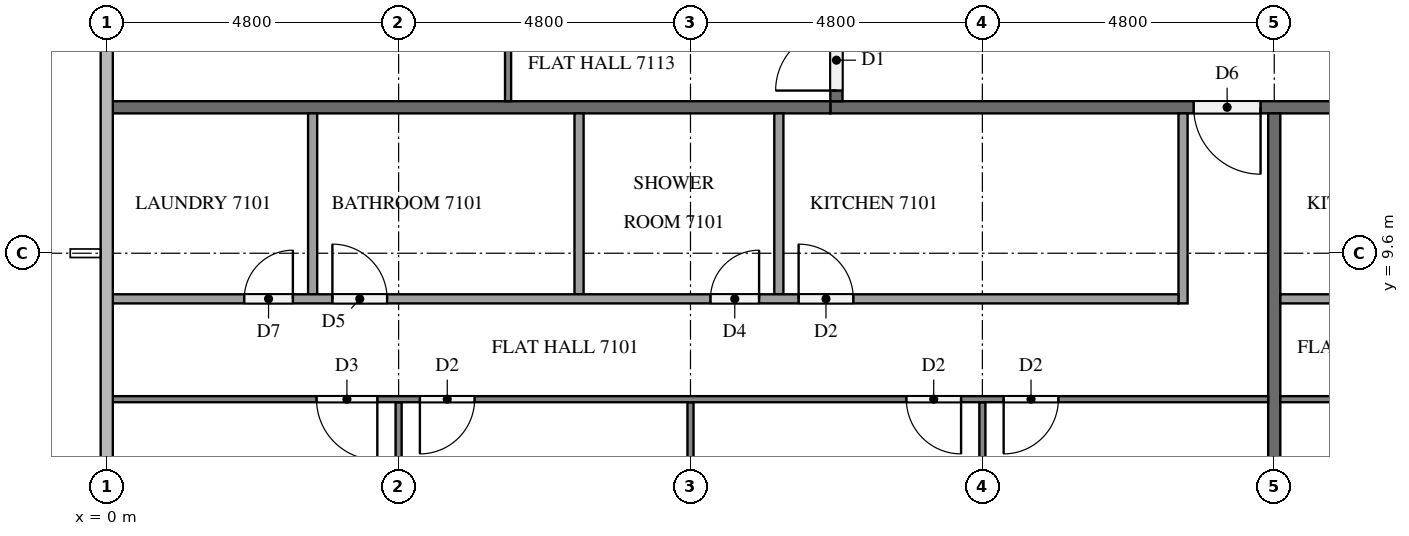
"""IFC4 building model, lengths in metres.
Left out: names, types, materials, properties, quantities, classifications, styles, units other than length and angle.
Written with IfcOpenShell. Run it as: python <this file> out.ifc"""

import sys

from ifc_helpers import new_model, si_unit, direction, frame, frame_2d, origin, place, context, subcontext, project, spatial, rectangle, extrude, element, fill, save


model = new_model("IFC4")
c1 = context("Model", 3, precision=1e-05, world=origin(), true_north=direction((0.0, 1.0)))
c2 = subcontext(c1, "Body", "Model", "MODEL_VIEW")
j1 = project(units=[si_unit("LENGTHUNIT", "METRE"), si_unit("PLANEANGLEUNIT", "RADIAN")], contexts=[c1])
p1 = place(None, origin())
s1 = spatial("IfcSite", under=j1, at=p1, CompositionType="ELEMENT")
p2 = place(p1, origin())
s2 = spatial("IfcBuilding", under=s1, at=p2, CompositionType="ELEMENT")
p3 = place(p2, frame((0.0, 0.0, 272.1)))
s3 = spatial("IfcBuildingStorey", under=s2, at=p3, CompositionType="ELEMENT", Elevation=272.1)
p4 = place(p3, frame((50.5, 12.0, 0.0), z_axis=(0.0, 0.0, 1.0), x_axis=(-1.0, 0.0, 0.0)))
e1 = element("IfcWall", 1, at=p4, inside=s3, PredefinedType="PARTITIONING", context=c2, shape_type="SweptSolid", body=[
    extrude(rectangle(XDim=38.6, YDim=0.2, at=frame_2d((19.3, 0.0))), origin(), (0.0, 0.0, 1.0), 3.2),
])
p5 = place(p4, frame((31.525, 0.0, 0.0)))
e2 = element("IfcOpeningElement", 2, at=p5, cuts=e1, PredefinedType="OPENING", context=c2, shape_type="SweptSolid", body=[
    extrude(rectangle(XDim=1.1, YDim=2.1, at=frame_2d((0.55, 1.05))), frame((0.0, 0.11, 0.0), z_axis=(0.0, -1.0, 0.0), x_axis=(1.0, 0.0, 0.0)), (0.0, 0.0, 1.0), 0.22),
])
p6 = place(p4, frame((19.575, 0.0, 0.0)))
e3 = element("IfcOpeningElement", 3, at=p6, cuts=e1, PredefinedType="OPENING", context=c2, shape_type="SweptSolid", body=[
    extrude(rectangle(XDim=1.0, YDim=2.1, at=frame_2d((0.5, 1.05))), frame((0.0, 0.11, 0.0), z_axis=(0.0, -1.0, 0.0), x_axis=(1.0, 0.0, 0.0)), (0.0, 0.0, 1.0), 0.22),
])
p7 = place(p4, frame((18.025, 0.0, 0.0)))
e4 = element("IfcOpeningElement", 4, at=p7, cuts=e1, PredefinedType="OPENING", context=c2, shape_type="SweptSolid", body=[
    extrude(rectangle(XDim=1.0, YDim=2.1, at=frame_2d((0.5, 1.05))), frame((0.0, 0.11, 0.0), z_axis=(0.0, -1.0, 0.0), x_axis=(1.0, 0.0, 0.0)), (0.0, 0.0, 1.0), 0.22),
])
p8 = place(p4, frame((1.225, 0.0, 0.0)))
e5 = element("IfcOpeningElement", 5, at=p8, cuts=e1, PredefinedType="OPENING", context=c2, shape_type="SweptSolid", body=[
    extrude(rectangle(XDim=1.0, YDim=2.1, at=frame_2d((0.5, 1.05))), frame((0.0, 0.11, 0.0), z_axis=(0.0, -1.0, 0.0), x_axis=(1.0, 0.0, 0.0)), (0.0, 0.0, 1.0), 0.22),
])
p9 = place(p3, frame((12.0, 12.1, 0.0), z_axis=(0.0, 0.0, 1.0), x_axis=(0.0, 1.0, 0.0)))
e6 = element("IfcWall", 6, at=p9, inside=s3, PredefinedType="PARTITIONING", context=c2, shape_type="SweptSolid", body=[
    extrude(rectangle(XDim=28.6, YDim=0.2, at=frame_2d((14.3, 0.0))), origin(), (0.0, 0.0, 1.0), 3.2),
])
p10 = place(p9, frame((24.175, 0.0, 0.0)))
e7 = element("IfcOpeningElement", 7, at=p10, cuts=e6, PredefinedType="OPENING", context=c2, shape_type="SweptSolid", body=[
    extrude(rectangle(XDim=1.0, YDim=2.1, at=frame_2d((0.5, 1.05))), frame((0.0, 0.11, 0.0), z_axis=(0.0, -1.0, 0.0), x_axis=(1.0, 0.0, 0.0)), (0.0, 0.0, 1.0), 0.22),
])
p11 = place(p9, frame((14.575, 0.0, 0.0)))
e8 = element("IfcOpeningElement", 8, at=p11, cuts=e6, PredefinedType="OPENING", context=c2, shape_type="SweptSolid", body=[
    extrude(rectangle(XDim=1.0, YDim=2.1, at=frame_2d((0.5, 1.05))), frame((0.0, 0.11, 0.0), z_axis=(0.0, -1.0, 0.0), x_axis=(1.0, 0.0, 0.0)), (0.0, 0.0, 1.0), 0.22),
])
p12 = place(p9, frame((0.175, 0.0, 0.0)))
e9 = element("IfcOpeningElement", 9, at=p12, cuts=e6, PredefinedType="OPENING", context=c2, shape_type="SweptSolid", body=[
    extrude(rectangle(XDim=1.0, YDim=2.1, at=frame_2d((0.5, 1.05))), frame((0.0, 0.11, 0.0), z_axis=(0.0, -1.0, 0.0), x_axis=(1.0, 0.0, 0.0)), (0.0, 0.0, 1.0), 0.22),
])
for number, where, z_axis, x_axis in (
    (10, (19.2, 11.9, 0.0), (0.0, 0.0, 1.0), (0.0, -1.0, 0.0)),
    (11, (0.1, 12.0, 0.0), (0.0, 0.0, 1.0), (1.0, 0.0, 0.0)),
):
    element("IfcWall", number, at=place(p3, frame(where, z_axis=z_axis, x_axis=x_axis)), inside=s3, PredefinedType="PARTITIONING", context=c2, shape_type="SweptSolid", body=[
        extrude(rectangle(XDim=11.8, YDim=0.2, at=frame_2d((5.9, 0.0))), origin(), (0.0, 0.0, 1.0), 3.2),
    ])
p13 = place(p3, frame((14.4, 7.15, 0.0), z_axis=(0.0, 0.0, 1.0), x_axis=(0.0, -1.0, 0.0)))
e12 = element("IfcWall", 12, at=p13, inside=s3, PredefinedType="PARTITIONING", context=c2, shape_type="SweptSolid", body=[
    extrude(rectangle(XDim=6.9, YDim=0.1, at=frame_2d((3.45, 0.0))), origin(), (0.0, 0.0, 1.0), 3.2),
])
p14 = place(p3, frame((9.6, 7.15, 0.0), z_axis=(0.0, 0.0, 1.0), x_axis=(0.0, -1.0, 0.0)))
e13 = element("IfcWall", 13, at=p14, inside=s3, PredefinedType="PARTITIONING", context=c2, shape_type="SweptSolid", body=[
    extrude(rectangle(XDim=7.05, YDim=0.1, at=frame_2d((3.525, 0.0))), origin(), (0.0, 0.0, 1.0), 3.2),
])
p15 = place(p3, frame((4.8, 7.15, 0.0), z_axis=(0.0, 0.0, 1.0), x_axis=(0.0, -1.0, 0.0)))
e14 = element("IfcWall", 14, at=p15, inside=s3, PredefinedType="PARTITIONING", context=c2, shape_type="SweptSolid", body=[
    extrude(rectangle(XDim=6.85, YDim=0.1, at=frame_2d((3.425, 0.0))), origin(), (0.0, 0.0, 1.0), 3.2),
])
p16 = place(p3, frame((19.1, 7.2, 0.0), z_axis=(0.0, 0.0, 1.0), x_axis=(-1.0, 0.0, 0.0)))
e15 = element("IfcWall", 15, at=p16, inside=s3, PredefinedType="PARTITIONING", context=c2, shape_type="SweptSolid", body=[
    extrude(rectangle(XDim=19.0, YDim=0.1, at=frame_2d((9.5, 0.0))), origin(), (0.0, 0.0, 1.0), 3.2),
])
p17 = place(p16, frame((3.45, 0.0, 0.0)))
e16 = element("IfcOpeningElement", 16, at=p17, cuts=e15, PredefinedType="OPENING", context=c2, shape_type="SweptSolid", body=[
    extrude(rectangle(XDim=0.9, YDim=2.1, at=frame_2d((0.45, 1.05))), frame((0.0, 0.06, 0.0), z_axis=(0.0, -1.0, 0.0), x_axis=(1.0, 0.0, 0.0)), (0.0, 0.0, 1.0), 0.12),
])
p18 = place(p16, frame((5.05, 0.0, 0.0)))
e17 = element("IfcOpeningElement", 17, at=p18, cuts=e15, PredefinedType="OPENING", context=c2, shape_type="SweptSolid", body=[
    extrude(rectangle(XDim=0.9, YDim=2.1, at=frame_2d((0.45, 1.05))), frame((0.0, 0.06, 0.0), z_axis=(0.0, -1.0, 0.0), x_axis=(1.0, 0.0, 0.0)), (0.0, 0.0, 1.0), 0.12),
])
p19 = place(p16, frame((13.05, 0.0, 0.0)))
e18 = element("IfcOpeningElement", 18, at=p19, cuts=e15, PredefinedType="OPENING", context=c2, shape_type="SweptSolid", body=[
    extrude(rectangle(XDim=0.9, YDim=2.1, at=frame_2d((0.45, 1.05))), frame((0.0, 0.06, 0.0), z_axis=(0.0, -1.0, 0.0), x_axis=(1.0, 0.0, 0.0)), (0.0, 0.0, 1.0), 0.12),
])
p20 = place(p16, frame((14.65, 0.0, 0.0)))
e19 = element("IfcOpeningElement", 19, at=p20, cuts=e15, PredefinedType="OPENING", context=c2, shape_type="SweptSolid", body=[
    extrude(rectangle(XDim=1.0, YDim=2.1, at=frame_2d((0.5, 1.05))), frame((0.0, 0.06, 0.0), z_axis=(0.0, -1.0, 0.0), x_axis=(1.0, 0.0, 0.0)), (0.0, 0.0, 1.0), 0.12),
])
for number, where, z_axis, x_axis in (
    (20, (11.053, 11.9, 0.0), (0.0, 0.0, 1.0), (0.0, -1.0, 0.0)),
    (21, (7.767, 11.9, 0.0), (0.0, 0.0, 1.0), (0.0, -1.0, 0.0)),
    (22, (3.386, 11.9, 0.0), (0.0, 0.0, 1.0), (0.0, -1.0, 0.0)),
):
    element("IfcWall", number, at=place(p3, frame(where, z_axis=z_axis, x_axis=x_axis)), inside=s3, PredefinedType="PARTITIONING", context=c2, shape_type="SweptSolid", body=[
        extrude(rectangle(XDim=2.975, YDim=0.15, at=frame_2d((1.487, 0.0))), origin(), (0.0, 0.0, 1.0), 3.2),
    ])
p21 = place(p3, frame((17.7, 11.9, 0.0), z_axis=(0.0, 0.0, 1.0), x_axis=(0.0, -1.0, 0.0)))
e23 = element("IfcWall", 23, at=p21, inside=s3, PredefinedType="PARTITIONING", context=c2, shape_type="SweptSolid", body=[
    extrude(rectangle(XDim=3.125, YDim=0.15, at=frame_2d((1.562, 0.0))), origin(), (0.0, 0.0, 1.0), 3.2),
])
p22 = place(p3, frame((0.1, 8.85, 0.0), z_axis=(0.0, 0.0, 1.0), x_axis=(1.0, 0.0, 0.0)))
e24 = element("IfcWall", 24, at=p22, inside=s3, PredefinedType="PARTITIONING", context=c2, shape_type="SweptSolid", body=[
    extrude(rectangle(XDim=17.525, YDim=0.15, at=frame_2d((8.762, 0.0))), origin(), (0.0, 0.0, 1.0), 3.2),
])
p23 = place(p22, frame((11.278, 0.0, 0.0)))
e25 = element("IfcOpeningElement", 25, at=p23, cuts=e24, PredefinedType="OPENING", context=c2, shape_type="SweptSolid", body=[
    extrude(rectangle(XDim=0.9, YDim=2.1, at=frame_2d((0.45, 1.05))), frame((0.0, 0.085, 0.0), z_axis=(0.0, -1.0, 0.0), x_axis=(1.0, 0.0, 0.0)), (0.0, 0.0, 1.0), 0.17),
])
p24 = place(p22, frame((9.828, 0.0, 0.0)))
e26 = element("IfcOpeningElement", 26, at=p24, cuts=e24, PredefinedType="OPENING", context=c2, shape_type="SweptSolid", body=[
    extrude(rectangle(XDim=0.8, YDim=2.1, at=frame_2d((0.4, 1.05))), frame((0.0, 0.085, 0.0), z_axis=(0.0, -1.0, 0.0), x_axis=(1.0, 0.0, 0.0)), (0.0, 0.0, 1.0), 0.17),
])
p25 = place(p22, frame((3.611, 0.0, 0.0)))
e27 = element("IfcOpeningElement", 27, at=p25, cuts=e24, PredefinedType="OPENING", context=c2, shape_type="SweptSolid", body=[
    extrude(rectangle(XDim=0.9, YDim=2.1, at=frame_2d((0.45, 1.05))), frame((0.0, 0.085, 0.0), z_axis=(0.0, -1.0, 0.0), x_axis=(1.0, 0.0, 0.0)), (0.0, 0.0, 1.0), 0.17),
])
p26 = place(p22, frame((2.161, 0.0, 0.0)))
e28 = element("IfcOpeningElement", 28, at=p26, cuts=e24, PredefinedType="OPENING", context=c2, shape_type="SweptSolid", body=[
    extrude(rectangle(XDim=0.8, YDim=2.1, at=frame_2d((0.4, 1.05))), frame((0.0, 0.085, 0.0), z_axis=(0.0, -1.0, 0.0), x_axis=(1.0, 0.0, 0.0)), (0.0, 0.0, 1.0), 0.17),
])
p27 = place(p3, frame((31.1, 7.2, 0.0), z_axis=(0.0, 0.0, 1.0), x_axis=(-1.0, 0.0, 0.0)))
e29 = element("IfcWall", 29, at=p27, inside=s3, PredefinedType="PARTITIONING", context=c2, shape_type="SweptSolid", body=[
    extrude(rectangle(XDim=11.8, YDim=0.1, at=frame_2d((5.9, 0.0))), origin(), (0.0, 0.0, 1.0), 3.2),
])
p28 = place(p27, frame((3.45, 0.0, 0.0)))
e30 = element("IfcOpeningElement", 30, at=p28, cuts=e29, PredefinedType="OPENING", context=c2, shape_type="SweptSolid", body=[
    extrude(rectangle(XDim=0.9, YDim=2.1, at=frame_2d((0.45, 1.05))), frame((0.0, 0.06, 0.0), z_axis=(0.0, -1.0, 0.0), x_axis=(1.0, 0.0, 0.0)), (0.0, 0.0, 1.0), 0.12),
])
p29 = place(p27, frame((5.05, 0.0, 0.0)))
e31 = element("IfcOpeningElement", 31, at=p29, cuts=e29, PredefinedType="OPENING", context=c2, shape_type="SweptSolid", body=[
    extrude(rectangle(XDim=1.0, YDim=2.1, at=frame_2d((0.5, 1.05))), frame((0.0, 0.06, 0.0), z_axis=(0.0, -1.0, 0.0), x_axis=(1.0, 0.0, 0.0)), (0.0, 0.0, 1.0), 0.12),
])
p30 = place(p3, frame((19.3, 8.85, 0.0), z_axis=(0.0, 0.0, 1.0), x_axis=(1.0, 0.0, 0.0)))
e32 = element("IfcWall", 32, at=p30, inside=s3, PredefinedType="PARTITIONING", context=c2, shape_type="SweptSolid", body=[
    extrude(rectangle(XDim=10.325, YDim=0.15, at=frame_2d((5.163, 0.0))), origin(), (0.0, 0.0, 1.0), 3.2),
])
p31 = place(p30, frame((6.52, 0.0, 0.0)))
e33 = element("IfcOpeningElement", 33, at=p31, cuts=e32, PredefinedType="OPENING", context=c2, shape_type="SweptSolid", body=[
    extrude(rectangle(XDim=0.8, YDim=2.1, at=frame_2d((0.4, 1.05))), frame((0.0, 0.085, 0.0), z_axis=(0.0, -1.0, 0.0), x_axis=(1.0, 0.0, 0.0)), (0.0, 0.0, 1.0), 0.17),
])
p32 = place(p30, frame((4.97, 0.0, 0.0)))
e34 = element("IfcOpeningElement", 34, at=p32, cuts=e32, PredefinedType="OPENING", context=c2, shape_type="SweptSolid", body=[
    extrude(rectangle(XDim=0.9, YDim=2.1, at=frame_2d((0.45, 1.05))), frame((0.0, 0.085, 0.0), z_axis=(0.0, -1.0, 0.0), x_axis=(1.0, 0.0, 0.0)), (0.0, 0.0, 1.0), 0.17),
])
p33 = place(p3, frame((6.6, 12.1, 0.0), z_axis=(0.0, 0.0, 1.0), x_axis=(0.0, 1.0, 0.0)))
e35 = element("IfcWall", 35, at=p33, inside=s3, PredefinedType="PARTITIONING", context=c2, shape_type="SweptSolid", body=[
    extrude(rectangle(XDim=14.2, YDim=0.1, at=frame_2d((7.1, 0.0))), origin(), (0.0, 0.0, 1.0), 3.2),
])
p34 = place(p33, frame((3.35, 0.0, 0.0)))
e36 = element("IfcOpeningElement", 36, at=p34, cuts=e35, PredefinedType="OPENING", context=c2, shape_type="SweptSolid", body=[
    extrude(rectangle(XDim=1.0, YDim=2.1, at=frame_2d((0.5, 1.05))), frame((0.0, 0.06, 0.0), z_axis=(0.0, -1.0, 0.0), x_axis=(1.0, 0.0, 0.0)), (0.0, 0.0, 1.0), 0.12),
])
p35 = place(p33, frame((5.05, 0.0, 0.0)))
e37 = element("IfcOpeningElement", 37, at=p35, cuts=e35, PredefinedType="OPENING", context=c2, shape_type="SweptSolid", body=[
    extrude(rectangle(XDim=0.9, YDim=2.1, at=frame_2d((0.45, 1.05))), frame((0.0, 0.06, 0.0), z_axis=(0.0, -1.0, 0.0), x_axis=(1.0, 0.0, 0.0)), (0.0, 0.0, 1.0), 0.12),
])
p36 = place(p33, frame((13.0, 0.0, 0.0)))
e38 = element("IfcOpeningElement", 38, at=p36, cuts=e35, PredefinedType="OPENING", context=c2, shape_type="SweptSolid", body=[
    extrude(rectangle(XDim=0.9, YDim=2.1, at=frame_2d((0.45, 1.05))), frame((0.0, 0.06, 0.0), z_axis=(0.0, -1.0, 0.0), x_axis=(1.0, 0.0, 0.0)), (0.0, 0.0, 1.0), 0.12),
])
p37 = place(p5, origin())
e39 = element("IfcDoor", 39, at=p37, inside=s3, OperationType="SINGLE_SWING_LEFT", PredefinedType="DOOR", context=c2, shape_type="SweptSolid", body=[
    extrude(rectangle(XDim=1.1, YDim=2.1, at=frame_2d((0.55, 1.05))), frame((0.0, 0.025, 0.0), z_axis=(0.0, -1.0, 0.0), x_axis=(1.0, 0.0, 0.0)), (0.0, 0.0, 1.0), 0.05),
])
fill(e2, e39)
p38 = place(p12, origin())
e40 = element("IfcDoor", 40, at=p38, inside=s3, OperationType="SINGLE_SWING_LEFT", PredefinedType="DOOR", context=c2, shape_type="SweptSolid", body=[
    extrude(rectangle(XDim=1.0, YDim=2.1, at=frame_2d((0.5, 1.05))), frame((0.0, 0.025, 0.0), z_axis=(0.0, -1.0, 0.0), x_axis=(1.0, 0.0, 0.0)), (0.0, 0.0, 1.0), 0.05),
])
fill(e9, e40)
p39 = place(p17, origin())
e41 = element("IfcDoor", 41, at=p39, inside=s3, OperationType="SINGLE_SWING_RIGHT", PredefinedType="DOOR", context=c2, shape_type="SweptSolid", body=[
    extrude(rectangle(XDim=0.9, YDim=2.1, at=frame_2d((0.45, 1.05))), frame((0.0, 0.025, 0.0), z_axis=(0.0, -1.0, 0.0), x_axis=(1.0, 0.0, 0.0)), (0.0, 0.0, 1.0), 0.05),
])
fill(e16, e41)
p40 = place(p18, origin())
e42 = element("IfcDoor", 42, at=p40, inside=s3, OperationType="SINGLE_SWING_LEFT", PredefinedType="DOOR", context=c2, shape_type="SweptSolid", body=[
    extrude(rectangle(XDim=0.9, YDim=2.1, at=frame_2d((0.45, 1.05))), frame((0.0, 0.025, 0.0), z_axis=(0.0, -1.0, 0.0), x_axis=(1.0, 0.0, 0.0)), (0.0, 0.0, 1.0), 0.05),
])
fill(e17, e42)
p41 = place(p19, origin())
e43 = element("IfcDoor", 43, at=p41, inside=s3, OperationType="SINGLE_SWING_RIGHT", PredefinedType="DOOR", context=c2, shape_type="SweptSolid", body=[
    extrude(rectangle(XDim=0.9, YDim=2.1, at=frame_2d((0.45, 1.05))), frame((0.0, 0.025, 0.0), z_axis=(0.0, -1.0, 0.0), x_axis=(1.0, 0.0, 0.0)), (0.0, 0.0, 1.0), 0.05),
])
fill(e18, e43)
p42 = place(p20, origin())
e44 = element("IfcDoor", 44, at=p42, inside=s3, OperationType="SINGLE_SWING_LEFT", PredefinedType="DOOR", context=c2, shape_type="SweptSolid", body=[
    extrude(rectangle(XDim=1.0, YDim=2.1, at=frame_2d((0.5, 1.05))), frame((0.0, 0.025, 0.0), z_axis=(0.0, -1.0, 0.0), x_axis=(1.0, 0.0, 0.0)), (0.0, 0.0, 1.0), 0.05),
])
fill(e19, e44)
p43 = place(p23, origin())
e45 = element("IfcDoor", 45, at=p43, inside=s3, OperationType="SINGLE_SWING_LEFT", PredefinedType="DOOR", context=c2, shape_type="SweptSolid", body=[
    extrude(rectangle(XDim=0.9, YDim=2.1, at=frame_2d((0.45, 1.05))), frame((0.0, 0.025, 0.0), z_axis=(0.0, -1.0, 0.0), x_axis=(1.0, 0.0, 0.0)), (0.0, 0.0, 1.0), 0.05),
])
fill(e25, e45)
p44 = place(p24, origin())
e46 = element("IfcDoor", 46, at=p44, inside=s3, OperationType="SINGLE_SWING_RIGHT", PredefinedType="DOOR", context=c2, shape_type="SweptSolid", body=[
    extrude(rectangle(XDim=0.8, YDim=2.1, at=frame_2d((0.4, 1.05))), frame((0.0, 0.025, 0.0), z_axis=(0.0, -1.0, 0.0), x_axis=(1.0, 0.0, 0.0)), (0.0, 0.0, 1.0), 0.05),
])
fill(e26, e46)
p45 = place(p25, origin())
e47 = element("IfcDoor", 47, at=p45, inside=s3, OperationType="SINGLE_SWING_LEFT", PredefinedType="DOOR", context=c2, shape_type="SweptSolid", body=[
    extrude(rectangle(XDim=0.9, YDim=2.1, at=frame_2d((0.45, 1.05))), frame((0.0, 0.025, 0.0), z_axis=(0.0, -1.0, 0.0), x_axis=(1.0, 0.0, 0.0)), (0.0, 0.0, 1.0), 0.05),
])
fill(e27, e47)
p46 = place(p26, origin())
e48 = element("IfcDoor", 48, at=p46, inside=s3, OperationType="SINGLE_SWING_RIGHT", PredefinedType="DOOR", context=c2, shape_type="SweptSolid", body=[
    extrude(rectangle(XDim=0.8, YDim=2.1, at=frame_2d((0.4, 1.05))), frame((0.0, 0.025, 0.0), z_axis=(0.0, -1.0, 0.0), x_axis=(1.0, 0.0, 0.0)), (0.0, 0.0, 1.0), 0.05),
])
fill(e28, e48)
save(model, sys.argv[1])
